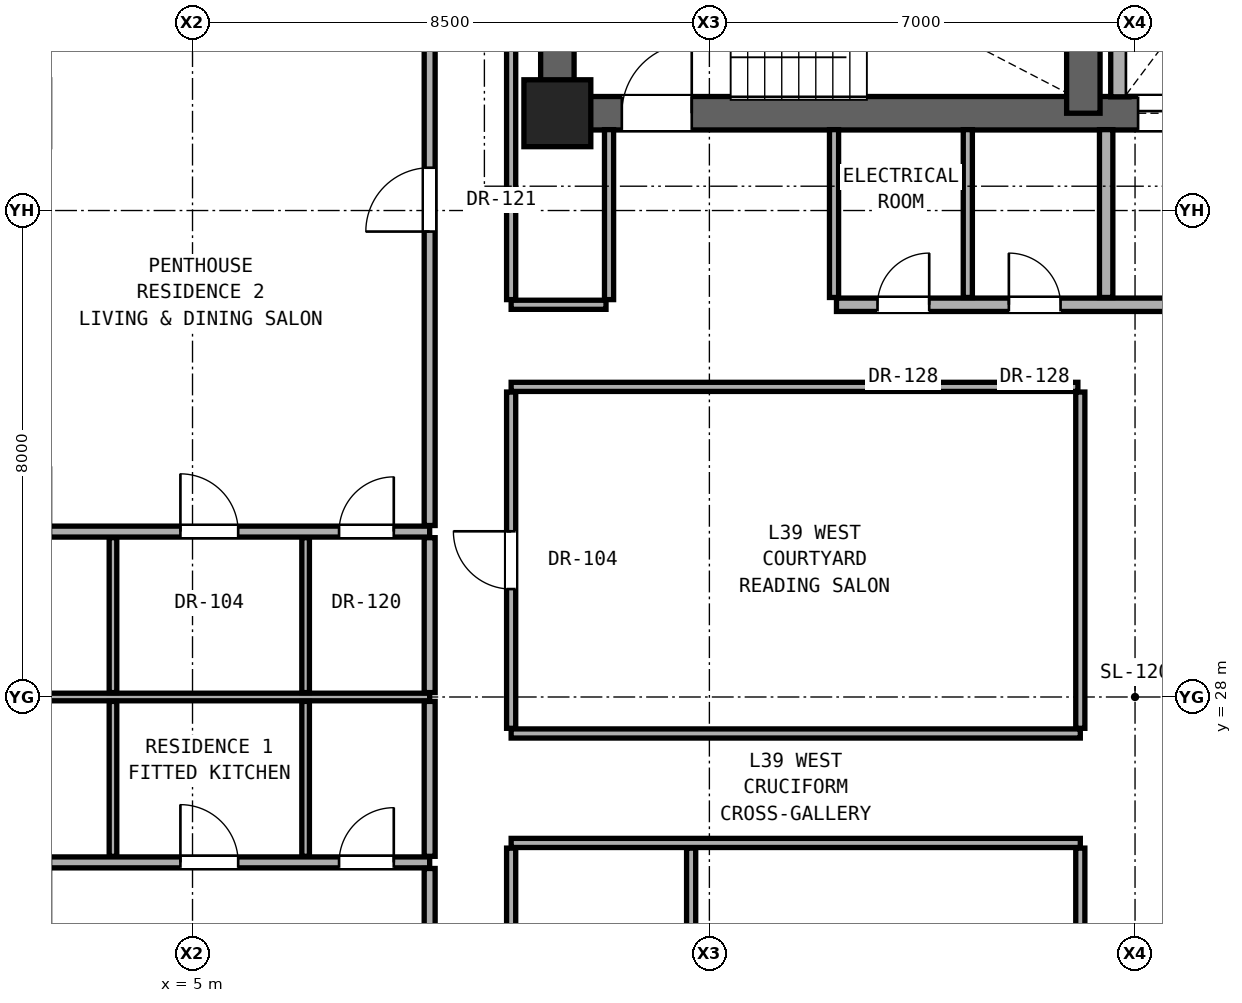
"""IFC4 building model, lengths in metres.
Left out: names, types, materials, properties, quantities, classifications, styles, units other than length and angle.
Written with IfcOpenShell. Run it as: python <this file> out.ifc"""

import sys

from ifc_helpers import new_model, si_unit, direction, frame, frame_2d, origin, origin_2d, place, context, subcontext, project, spatial, rectangle, extrude, element, fill, save


model = new_model("IFC4")
c1 = context("Model", 3, precision=1e-05, world=origin(), true_north=direction((0.0, 1.0)))
c2 = subcontext(c1, "Body", "Model", "MODEL_VIEW")
j1 = project(units=[si_unit("LENGTHUNIT", "METRE"), si_unit("PLANEANGLEUNIT", "RADIAN")], contexts=[c1])
p1 = place(None, origin())
s1 = spatial("IfcSite", under=j1, at=p1, CompositionType="ELEMENT")
p2 = place(p1, origin())
s2 = spatial("IfcBuilding", under=s1, at=p2, CompositionType="ELEMENT")
p3 = place(p2, frame((0.0, 0.0, 137.9)))
s3 = spatial("IfcBuildingStorey", under=s2, at=p3, CompositionType="ELEMENT", Elevation=137.9)
p4 = place(p3, frame((11.0, 37.6, 0.0), z_axis=(0.0, 0.0, 1.0), x_axis=(1.0, 0.0, 0.0)))
e1 = element("IfcColumn", 1, at=p4, inside=s3, PredefinedType="COLUMN", context=c2, shape_type="SweptSolid", body=[
    extrude(rectangle(XDim=1.1, YDim=1.1, at=origin_2d()), origin(), (0.0, 0.0, 1.0), 3.3),
])
p5 = place(p3, frame((11.0, 37.6, 0.0), z_axis=(0.0, 0.0, 1.0), x_axis=(0.0, 1.0, 0.0)))
e2 = element("IfcWall", 2, at=p5, inside=s3, PredefinedType="SHEAR", context=c2, shape_type="SweptSolid", body=[
    extrude(rectangle(XDim=6.0, YDim=0.55, at=frame_2d((3.0, 0.0))), origin(), (0.0, 0.0, 1.0), 3.08),
])
p6 = place(p3, frame((11.0, 37.6, 0.0), z_axis=(0.0, 0.0, 1.0), x_axis=(1.0, 0.0, 0.0)))
e3 = element("IfcWall", 3, at=p6, inside=s3, PredefinedType="SHEAR", context=c2, shape_type="SweptSolid", body=[
    extrude(rectangle(XDim=19.0, YDim=0.55, at=frame_2d((9.5, 0.0))), origin(), (0.0, 0.0, 1.0), 3.08),
])
p7 = place(p6, frame((1.06, 0.0, 0.0)))
e4 = element("IfcOpeningElement", 4, at=p7, cuts=e3, PredefinedType="OPENING", context=c2, shape_type="SweptSolid", body=[
    extrude(rectangle(XDim=1.15, YDim=2.2, at=frame_2d((0.575, 1.1))), frame((0.0, 0.285, 0.0), z_axis=(0.0, -1.0, 0.0), x_axis=(1.0, 0.0, 0.0)), (0.0, 0.0, 1.0), 0.57),
])
p8 = place(p6, frame((9.55, 0.0, 0.0)))
e5 = element("IfcOpeningElement", 5, at=p8, cuts=e3, PredefinedType="OPENING", context=c2, shape_type="SweptSolid", body=[
    extrude(rectangle(XDim=1.4, YDim=2.35, at=frame_2d((0.7, 1.175))), frame((0.0, 0.285, 0.0), z_axis=(0.0, -1.0, 0.0), x_axis=(1.0, 0.0, 0.0)), (0.0, 0.0, 1.0), 0.57),
])
p9 = place(p6, frame((11.95, 0.0, 0.0)))
e6 = element("IfcOpeningElement", 6, at=p9, cuts=e3, PredefinedType="OPENING", context=c2, shape_type="SweptSolid", body=[
    extrude(rectangle(XDim=1.4, YDim=2.35, at=frame_2d((0.7, 1.175))), frame((0.0, 0.285, 0.0), z_axis=(0.0, -1.0, 0.0), x_axis=(1.0, 0.0, 0.0)), (0.0, 0.0, 1.0), 0.57),
])
p10 = place(p3, frame((19.65, 37.6, 0.0), z_axis=(0.0, 0.0, 1.0), x_axis=(0.0, 1.0, 0.0)))
e7 = element("IfcWall", 7, at=p10, inside=s3, PredefinedType="SHEAR", context=c2, shape_type="SweptSolid", body=[
    extrude(rectangle(XDim=3.443, YDim=0.55, at=frame_2d((1.721, 0.0))), origin(), (0.0, 0.0, 1.0), 3.08),
])
p11 = place(p3, frame((-1.06, 25.28, 0.0), z_axis=(0.0, 0.0, 1.0), x_axis=(1.0, 0.0, 0.0)))
e8 = element("IfcWall", 8, at=p11, inside=s3, PredefinedType="PARTITIONING", context=c2, shape_type="SweptSolid", body=[
    extrude(rectangle(XDim=9.96, YDim=0.18, at=frame_2d((4.98, 0.0))), origin(), (0.0, 0.0, 1.0), 2.299),
])
p12 = place(p11, frame((1.321, 0.0, 0.0)))
e9 = element("IfcOpeningElement", 9, at=p12, cuts=e8, PredefinedType="OPENING", context=c2, shape_type="SweptSolid", body=[
    extrude(rectangle(XDim=0.95, YDim=2.15, at=frame_2d((0.475, 1.075))), frame((0.0, 0.1, 0.0), z_axis=(0.0, -1.0, 0.0), x_axis=(1.0, 0.0, 0.0)), (0.0, 0.0, 1.0), 0.2),
])
p13 = place(p11, frame((5.861, 0.0, 0.0)))
e10 = element("IfcOpeningElement", 10, at=p13, cuts=e8, PredefinedType="OPENING", context=c2, shape_type="SweptSolid", body=[
    extrude(rectangle(XDim=0.95, YDim=2.15, at=frame_2d((0.475, 1.075))), frame((0.0, 0.1, 0.0), z_axis=(0.0, -1.0, 0.0), x_axis=(1.0, 0.0, 0.0)), (0.0, 0.0, 1.0), 0.2),
])
p14 = place(p11, frame((8.47, 0.0, 0.0)))
e11 = element("IfcOpeningElement", 11, at=p14, cuts=e8, PredefinedType="OPENING", context=c2, shape_type="SweptSolid", body=[
    extrude(rectangle(XDim=0.9, YDim=2.1, at=frame_2d((0.45, 1.05))), frame((0.0, 0.1, 0.0), z_axis=(0.0, -1.0, 0.0), x_axis=(1.0, 0.0, 0.0)), (0.0, 0.0, 1.0), 0.2),
])
for number, where, z_axis, x_axis in (
    (12, (10.24, 25.6, 0.0), (0.0, 0.0, 1.0), (1.0, 0.0, 0.0)),
    (13, (10.24, 27.4, 0.0), (0.0, 0.0, 1.0), (1.0, 0.0, 0.0)),
):
    element("IfcWall", number, at=place(p3, frame(where, z_axis=z_axis, x_axis=x_axis)), inside=s3, PredefinedType="PARTITIONING", context=c2, shape_type="SweptSolid", body=[
        extrude(rectangle(XDim=9.36, YDim=0.15, at=frame_2d((4.68, 0.0))), origin(), (0.0, 0.0, 1.0), 2.216),
    ])
p15 = place(p3, frame((-1.06, 28.0, 0.0), z_axis=(0.0, 0.0, 1.0), x_axis=(1.0, 0.0, 0.0)))
e14 = element("IfcWall", 14, at=p15, inside=s3, PredefinedType="PARTITIONING", context=c2, shape_type="SweptSolid", body=[
    extrude(rectangle(XDim=9.96, YDim=0.125, at=frame_2d((4.98, 0.0))), origin(), (0.0, 0.0, 1.0), 2.299),
])
p16 = place(p3, frame((-1.06, 30.72, 0.0), z_axis=(0.0, 0.0, 1.0), x_axis=(1.0, 0.0, 0.0)))
e15 = element("IfcWall", 15, at=p16, inside=s3, PredefinedType="PARTITIONING", context=c2, shape_type="SweptSolid", body=[
    extrude(rectangle(XDim=9.96, YDim=0.18, at=frame_2d((4.98, 0.0))), origin(), (0.0, 0.0, 1.0), 2.299),
])
p17 = place(p16, frame((1.321, 0.0, 0.0)))
e16 = element("IfcOpeningElement", 16, at=p17, cuts=e15, PredefinedType="OPENING", context=c2, shape_type="SweptSolid", body=[
    extrude(rectangle(XDim=0.95, YDim=2.15, at=frame_2d((0.475, 1.075))), frame((0.0, 0.1, 0.0), z_axis=(0.0, -1.0, 0.0), x_axis=(1.0, 0.0, 0.0)), (0.0, 0.0, 1.0), 0.2),
])
p18 = place(p16, frame((5.861, 0.0, 0.0)))
e17 = element("IfcOpeningElement", 17, at=p18, cuts=e15, PredefinedType="OPENING", context=c2, shape_type="SweptSolid", body=[
    extrude(rectangle(XDim=0.95, YDim=2.15, at=frame_2d((0.475, 1.075))), frame((0.0, 0.1, 0.0), z_axis=(0.0, -1.0, 0.0), x_axis=(1.0, 0.0, 0.0)), (0.0, 0.0, 1.0), 0.2),
])
p19 = place(p16, frame((8.47, 0.0, 0.0)))
e18 = element("IfcOpeningElement", 18, at=p19, cuts=e15, PredefinedType="OPENING", context=c2, shape_type="SweptSolid", body=[
    extrude(rectangle(XDim=0.9, YDim=2.1, at=frame_2d((0.45, 1.05))), frame((0.0, 0.1, 0.0), z_axis=(0.0, -1.0, 0.0), x_axis=(1.0, 0.0, 0.0)), (0.0, 0.0, 1.0), 0.2),
])
p20 = place(p3, frame((10.24, 33.1, 0.0), z_axis=(0.0, 0.0, 1.0), x_axis=(1.0, 0.0, 0.0)))
e19 = element("IfcWall", 19, at=p20, inside=s3, PredefinedType="PARTITIONING", context=c2, shape_type="SweptSolid", body=[
    extrude(rectangle(XDim=9.32, YDim=0.15, at=frame_2d((4.66, 0.0))), origin(), (0.0, 0.0, 1.0), 2.216),
])
p21 = place(p3, frame((10.24, 34.45, 0.0), z_axis=(0.0, 0.0, 1.0), x_axis=(1.0, 0.0, 0.0)))
e20 = element("IfcWall", 20, at=p21, inside=s3, PredefinedType="PARTITIONING", context=c2, shape_type="SweptSolid", body=[
    extrude(rectangle(XDim=1.56, YDim=0.15, at=frame_2d((0.78, 0.0))), origin(), (0.0, 0.0, 1.0), 2.216),
])
p22 = place(p3, frame((15.59, 34.45, 0.0), z_axis=(0.0, 0.0, 1.0), x_axis=(1.0, 0.0, 0.0)))
e21 = element("IfcWall", 21, at=p22, inside=s3, PredefinedType="SOLIDWALL", context=c2, shape_type="SweptSolid", body=[
    extrude(rectangle(XDim=15.17, YDim=0.22, at=frame_2d((7.585, 0.0))), origin(), (0.0, 0.0, 1.0), 2.216),
])
p23 = place(p22, frame((6.435, 0.0, 0.0)))
e22 = element("IfcOpeningElement", 22, at=p23, cuts=e21, PredefinedType="OPENING", context=c2, shape_type="SweptSolid", body=[
    extrude(rectangle(XDim=0.85, YDim=2.01, at=frame_2d((0.425, 1.005))), frame((0.0, 0.12, 0.0), z_axis=(0.0, -1.0, 0.0), x_axis=(1.0, 0.0, 0.0)), (0.0, 0.0, 1.0), 0.24),
])
p24 = place(p22, frame((9.96, 0.0, 0.0)))
e23 = element("IfcOpeningElement", 23, at=p24, cuts=e21, PredefinedType="OPENING", context=c2, shape_type="SweptSolid", body=[
    extrude(rectangle(XDim=0.95, YDim=2.15, at=frame_2d((0.475, 1.075))), frame((0.0, 0.12, 0.0), z_axis=(0.0, -1.0, 0.0), x_axis=(1.0, 0.0, 0.0)), (0.0, 0.0, 1.0), 0.24),
])
p25 = place(p22, frame((12.21, 0.0, 0.0)))
e24 = element("IfcOpeningElement", 24, at=p25, cuts=e21, PredefinedType="OPENING", context=c2, shape_type="SweptSolid", body=[
    extrude(rectangle(XDim=0.95, YDim=2.15, at=frame_2d((0.475, 1.075))), frame((0.0, 0.12, 0.0), z_axis=(0.0, -1.0, 0.0), x_axis=(1.0, 0.0, 0.0)), (0.0, 0.0, 1.0), 0.24),
])
p26 = place(p22, frame((0.675, 0.0, 0.0)))
e25 = element("IfcOpeningElement", 25, at=p26, cuts=e21, PredefinedType="OPENING", context=c2, shape_type="SweptSolid", body=[
    extrude(rectangle(XDim=0.85, YDim=2.01, at=frame_2d((0.425, 1.005))), frame((0.0, 0.12, 0.0), z_axis=(0.0, -1.0, 0.0), x_axis=(1.0, 0.0, 0.0)), (0.0, 0.0, 1.0), 0.24),
])
p27 = place(p22, frame((2.835, 0.0, 0.0)))
e26 = element("IfcOpeningElement", 26, at=p27, cuts=e21, PredefinedType="OPENING", context=c2, shape_type="SweptSolid", body=[
    extrude(rectangle(XDim=0.85, YDim=2.01, at=frame_2d((0.425, 1.005))), frame((0.0, 0.12, 0.0), z_axis=(0.0, -1.0, 0.0), x_axis=(1.0, 0.0, 0.0)), (0.0, 0.0, 1.0), 0.24),
])
for number, where, z_axis, x_axis in (
    (27, (3.692, 25.38, 0.0), (0.0, 0.0, 1.0), (0.0, 1.0, 0.0)),
    (28, (3.692, 28.073, 0.0), (0.0, 0.0, 1.0), (0.0, 1.0, 0.0)),
    (29, (6.86, 25.38, 0.0), (0.0, 0.0, 1.0), (0.0, 1.0, 0.0)),
    (30, (6.86, 28.073, 0.0), (0.0, 0.0, 1.0), (0.0, 1.0, 0.0)),
):
    element("IfcWall", number, at=place(p3, frame(where, z_axis=z_axis, x_axis=x_axis)), inside=s3, PredefinedType="PARTITIONING", context=c2, shape_type="SweptSolid", body=[
        extrude(rectangle(XDim=2.548, YDim=0.125, at=frame_2d((1.274, 0.0))), origin(), (0.0, 0.0, 1.0), 3.08),
    ])
p28 = place(p3, frame((8.9, 14.462, 0.0), z_axis=(0.0, 0.0, 1.0), x_axis=(0.0, 1.0, 0.0)))
e31 = element("IfcWall", 31, at=p28, inside=s3, PredefinedType="PARTITIONING", context=c2, shape_type="SweptSolid", body=[
    extrude(rectangle(XDim=10.718, YDim=0.18, at=frame_2d((5.359, 0.0))), origin(), (0.0, 0.0, 1.0), 2.299),
])
p29 = place(p28, frame((4.834, 0.0, 0.0)))
e32 = element("IfcOpeningElement", 32, at=p29, cuts=e31, PredefinedType="OPENING", context=c2, shape_type="SweptSolid", body=[
    extrude(rectangle(XDim=1.05, YDim=2.2, at=frame_2d((0.525, 1.1))), frame((0.0, 0.1, 0.0), z_axis=(0.0, -1.0, 0.0), x_axis=(1.0, 0.0, 0.0)), (0.0, 0.0, 1.0), 0.2),
])
for number, where, z_axis, x_axis in (
    (33, (8.9, 25.38, 0.0), (0.0, 0.0, 1.0), (0.0, 1.0, 0.0)),
    (34, (8.9, 28.073, 0.0), (0.0, 0.0, 1.0), (0.0, 1.0, 0.0)),
):
    element("IfcWall", number, at=place(p3, frame(where, z_axis=z_axis, x_axis=x_axis)), inside=s3, PredefinedType="PARTITIONING", context=c2, shape_type="SweptSolid", body=[
        extrude(rectangle(XDim=2.548, YDim=0.18, at=frame_2d((1.274, 0.0))), origin(), (0.0, 0.0, 1.0), 3.08),
    ])
p30 = place(p3, frame((8.9, 30.82, 0.0), z_axis=(0.0, 0.0, 1.0), x_axis=(0.0, 1.0, 0.0)))
e35 = element("IfcWall", 35, at=p30, inside=s3, PredefinedType="PARTITIONING", context=c2, shape_type="SweptSolid", body=[
    extrude(rectangle(XDim=10.718, YDim=0.18, at=frame_2d((5.359, 0.0))), origin(), (0.0, 0.0, 1.0), 2.299),
])
p31 = place(p30, frame((4.834, 0.0, 0.0)))
e36 = element("IfcOpeningElement", 36, at=p31, cuts=e35, PredefinedType="OPENING", context=c2, shape_type="SweptSolid", body=[
    extrude(rectangle(XDim=1.05, YDim=2.2, at=frame_2d((0.525, 1.1))), frame((0.0, 0.1, 0.0), z_axis=(0.0, -1.0, 0.0), x_axis=(1.0, 0.0, 0.0)), (0.0, 0.0, 1.0), 0.2),
])
p32 = place(p3, frame((10.24, 22.935, 0.0), z_axis=(0.0, 0.0, 1.0), x_axis=(0.0, 1.0, 0.0)))
e37 = element("IfcWall", 37, at=p32, inside=s3, PredefinedType="PARTITIONING", context=c2, shape_type="SweptSolid", body=[
    extrude(rectangle(XDim=2.58, YDim=0.15, at=frame_2d((1.29, 0.0))), origin(), (0.0, 0.0, 1.0), 2.299),
])
p33 = place(p3, frame((10.24, 27.485, 0.0), z_axis=(0.0, 0.0, 1.0), x_axis=(0.0, 1.0, 0.0)))
e38 = element("IfcWall", 38, at=p33, inside=s3, PredefinedType="PARTITIONING", context=c2, shape_type="SweptSolid", body=[
    extrude(rectangle(XDim=5.53, YDim=0.15, at=frame_2d((2.765, 0.0))), origin(), (0.0, 0.0, 1.0), 2.299),
])
p34 = place(p33, frame((2.29, 0.0, 0.0)))
e39 = element("IfcOpeningElement", 39, at=p34, cuts=e38, PredefinedType="OPENING", context=c2, shape_type="SweptSolid", body=[
    extrude(rectangle(XDim=0.95, YDim=2.15, at=frame_2d((0.475, 1.075))), frame((0.0, 0.085, 0.0), z_axis=(0.0, -1.0, 0.0), x_axis=(1.0, 0.0, 0.0)), (0.0, 0.0, 1.0), 0.17),
])
p35 = place(p3, frame((10.24, 34.535, 0.0), z_axis=(0.0, 0.0, 1.0), x_axis=(0.0, 1.0, 0.0)))
e40 = element("IfcWall", 40, at=p35, inside=s3, PredefinedType="PARTITIONING", context=c2, shape_type="SweptSolid", body=[
    extrude(rectangle(XDim=9.13, YDim=0.15, at=frame_2d((4.565, 0.0))), origin(), (0.0, 0.0, 1.0), 2.456),
])
p36 = place(p3, frame((11.85, 34.535, 0.0), z_axis=(0.0, 0.0, 1.0), x_axis=(0.0, 1.0, 0.0)))
e41 = element("IfcWall", 41, at=p36, inside=s3, PredefinedType="PARTITIONING", context=c2, shape_type="SweptSolid", body=[
    extrude(rectangle(XDim=2.795, YDim=0.15, at=frame_2d((1.397, 0.0))), origin(), (0.0, 0.0, 1.0), 3.08),
])
p37 = place(p3, frame((13.2, 22.935, 0.0), z_axis=(0.0, 0.0, 1.0), x_axis=(0.0, 1.0, 0.0)))
e42 = element("IfcWall", 42, at=p37, inside=s3, PredefinedType="PARTITIONING", context=c2, shape_type="SweptSolid", body=[
    extrude(rectangle(XDim=2.58, YDim=0.15, at=frame_2d((1.29, 0.0))), origin(), (0.0, 0.0, 1.0), 2.216),
])
p38 = place(p3, frame((15.55, 34.57, 0.0), z_axis=(0.0, 0.0, 1.0), x_axis=(0.0, 1.0, 0.0)))
e43 = element("IfcWall", 43, at=p38, inside=s3, PredefinedType="PARTITIONING", context=c2, shape_type="SweptSolid", body=[
    extrude(rectangle(XDim=2.76, YDim=0.15, at=frame_2d((1.38, 0.0))), origin(), (0.0, 0.0, 1.0), 2.609),
])
p39 = place(p3, frame((17.75, 34.57, 0.0), z_axis=(0.0, 0.0, 1.0), x_axis=(0.0, 1.0, 0.0)))
e44 = element("IfcWall", 44, at=p39, inside=s3, PredefinedType="PARTITIONING", context=c2, shape_type="SweptSolid", body=[
    extrude(rectangle(XDim=2.76, YDim=0.15, at=frame_2d((1.38, 0.0))), origin(), (0.0, 0.0, 1.0), 3.08),
])
for number, where, z_axis, x_axis in (
    (45, (19.6, 19.985, 0.0), (0.0, 0.0, 1.0), (0.0, 1.0, 0.0)),
    (46, (19.6, 27.485, 0.0), (0.0, 0.0, 1.0), (0.0, 1.0, 0.0)),
):
    element("IfcWall", number, at=place(p3, frame(where, z_axis=z_axis, x_axis=x_axis)), inside=s3, PredefinedType="PARTITIONING", context=c2, shape_type="SweptSolid", body=[
        extrude(rectangle(XDim=5.53, YDim=0.15, at=frame_2d((2.765, 0.0))), origin(), (0.0, 0.0, 1.0), 2.216),
    ])
p40 = place(p3, frame((20.025, 34.57, 0.0), z_axis=(0.0, 0.0, 1.0), x_axis=(0.0, 1.0, 0.0)))
e47 = element("IfcWall", 47, at=p40, inside=s3, PredefinedType="SOLIDWALL", context=c2, shape_type="SweptSolid", body=[
    extrude(rectangle(XDim=2.76, YDim=0.22, at=frame_2d((1.38, 0.0))), origin(), (0.0, 0.0, 1.0), 3.08),
])
p41 = place(p3, frame((20.25, 37.87, 0.0), z_axis=(0.0, 0.0, 1.0), x_axis=(0.0, 1.0, 0.0)))
e48 = element("IfcWall", 48, at=p41, inside=s3, PredefinedType="SOLIDWALL", context=c2, shape_type="SweptSolid", body=[
    extrude(rectangle(XDim=2.37, YDim=0.3, at=frame_2d((1.185, 0.0))), origin(), (0.0, 0.0, 1.0), 3.08),
])
p42 = place(p7, origin())
e49 = element("IfcDoor", 49, at=p42, inside=s3, OperationType="SINGLE_SWING_RIGHT", PredefinedType="DOOR", context=c2, shape_type="SweptSolid", body=[
    extrude(rectangle(XDim=1.15, YDim=2.2, at=frame_2d((0.575, 1.1))), frame((0.0, 0.025, 0.0), z_axis=(0.0, -1.0, 0.0), x_axis=(1.0, 0.0, 0.0)), (0.0, 0.0, 1.0), 0.05),
])
fill(e4, e49)
p43 = place(p26, origin())
e50 = element("IfcDoor", 50, at=p43, inside=s3, OperationType="SINGLE_SWING_RIGHT", PredefinedType="DOOR", context=c2, shape_type="SweptSolid", body=[
    extrude(rectangle(XDim=0.85, YDim=2.01, at=frame_2d((0.425, 1.005))), frame((0.0, 0.025, 0.0), z_axis=(0.0, -1.0, 0.0), x_axis=(1.0, 0.0, 0.0)), (0.0, 0.0, 1.0), 0.05),
])
fill(e25, e50)
p44 = place(p27, origin())
e51 = element("IfcDoor", 51, at=p44, inside=s3, OperationType="SINGLE_SWING_LEFT", PredefinedType="DOOR", context=c2, shape_type="SweptSolid", body=[
    extrude(rectangle(XDim=0.85, YDim=2.01, at=frame_2d((0.425, 1.005))), frame((0.0, 0.025, 0.0), z_axis=(0.0, -1.0, 0.0), x_axis=(1.0, 0.0, 0.0)), (0.0, 0.0, 1.0), 0.05),
])
fill(e26, e51)
p45 = place(p13, origin())
e52 = element("IfcDoor", 52, at=p45, inside=s3, OperationType="SINGLE_SWING_LEFT", PredefinedType="DOOR", context=c2, shape_type="SweptSolid", body=[
    extrude(rectangle(XDim=0.95, YDim=2.15, at=frame_2d((0.475, 1.075))), frame((0.0, 0.025, 0.0), z_axis=(0.0, -1.0, 0.0), x_axis=(1.0, 0.0, 0.0)), (0.0, 0.0, 1.0), 0.05),
])
fill(e10, e52)
p46 = place(p14, origin())
e53 = element("IfcDoor", 53, at=p46, inside=s3, OperationType="SINGLE_SWING_RIGHT", PredefinedType="DOOR", context=c2, shape_type="SweptSolid", body=[
    extrude(rectangle(XDim=0.9, YDim=2.1, at=frame_2d((0.45, 1.05))), frame((0.0, 0.025, 0.0), z_axis=(0.0, -1.0, 0.0), x_axis=(1.0, 0.0, 0.0)), (0.0, 0.0, 1.0), 0.05),
])
fill(e11, e53)
p47 = place(p31, origin())
e54 = element("IfcDoor", 54, at=p47, inside=s3, OperationType="SINGLE_SWING_LEFT", PredefinedType="DOOR", context=c2, shape_type="SweptSolid", body=[
    extrude(rectangle(XDim=1.05, YDim=2.2, at=frame_2d((0.525, 1.1))), frame((0.0, 0.025, 0.0), z_axis=(0.0, -1.0, 0.0), x_axis=(1.0, 0.0, 0.0)), (0.0, 0.0, 1.0), 0.05),
])
fill(e36, e54)
p48 = place(p18, origin())
e55 = element("IfcDoor", 55, at=p48, inside=s3, OperationType="SINGLE_SWING_LEFT", PredefinedType="DOOR", context=c2, shape_type="SweptSolid", body=[
    extrude(rectangle(XDim=0.95, YDim=2.15, at=frame_2d((0.475, 1.075))), frame((0.0, 0.025, 0.0), z_axis=(0.0, -1.0, 0.0), x_axis=(1.0, 0.0, 0.0)), (0.0, 0.0, 1.0), 0.05),
])
fill(e17, e55)
p49 = place(p19, origin())
e56 = element("IfcDoor", 56, at=p49, inside=s3, OperationType="SINGLE_SWING_RIGHT", PredefinedType="DOOR", context=c2, shape_type="SweptSolid", body=[
    extrude(rectangle(XDim=0.9, YDim=2.1, at=frame_2d((0.45, 1.05))), frame((0.0, 0.025, 0.0), z_axis=(0.0, -1.0, 0.0), x_axis=(1.0, 0.0, 0.0)), (0.0, 0.0, 1.0), 0.05),
])
fill(e18, e56)
p50 = place(p34, origin())
e57 = element("IfcDoor", 57, at=p50, inside=s3, OperationType="SINGLE_SWING_RIGHT", PredefinedType="DOOR", context=c2, shape_type="SweptSolid", body=[
    extrude(rectangle(XDim=0.95, YDim=2.15, at=frame_2d((0.475, 1.075))), frame((0.0, 0.025, 0.0), z_axis=(0.0, -1.0, 0.0), x_axis=(1.0, 0.0, 0.0)), (0.0, 0.0, 1.0), 0.05),
])
fill(e39, e57)
p51 = place(p8, origin())
e58 = element("IfcDoor", 58, at=p51, inside=s3, OperationType="DOUBLE_DOOR_SLIDING", PredefinedType="DOOR", context=c2, shape_type="SweptSolid", body=[
    extrude(rectangle(XDim=1.4, YDim=2.35, at=frame_2d((0.7, 1.175))), frame((0.0, 0.025, 0.0), z_axis=(0.0, -1.0, 0.0), x_axis=(1.0, 0.0, 0.0)), (0.0, 0.0, 1.0), 0.05),
])
fill(e5, e58)
save(model, sys.argv[1])
